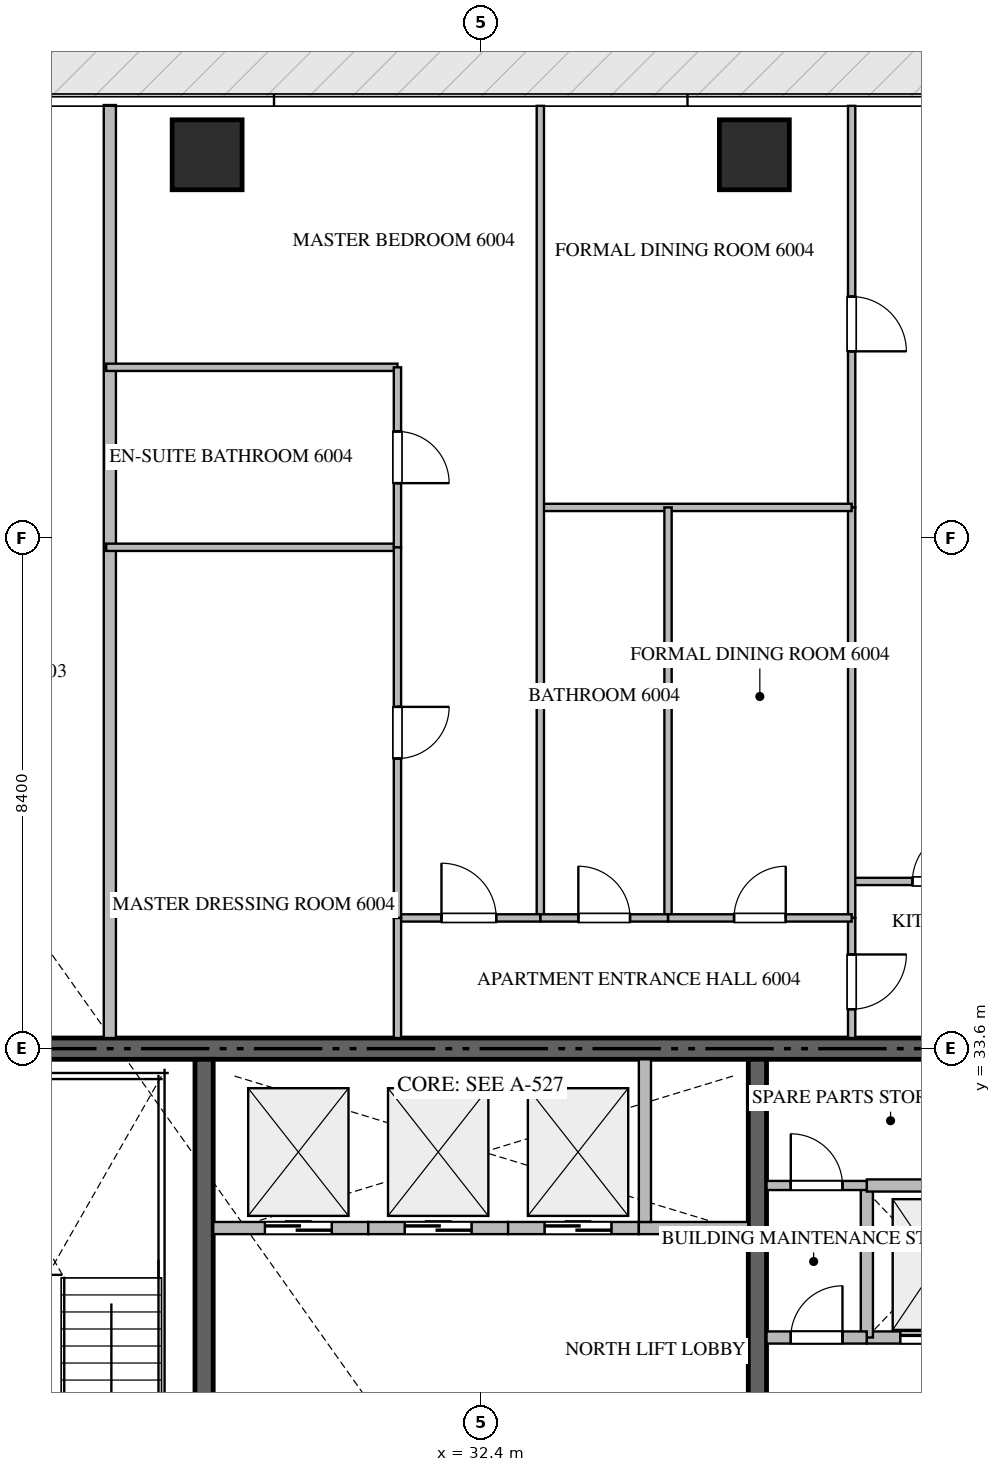
"""IFC4 building model, lengths in metres.
Left out: names, types, materials, properties, quantities, classifications, styles, units other than length and angle.
Written with IfcOpenShell. Run it as: python <this file> out.ifc"""

import sys

from ifc_helpers import new_model, si_unit, direction, frame, frame_2d, origin, origin_2d, place, context, subcontext, project, spatial, rectangle, extrude, source, transform, mapped, element, fill, save


model = new_model("IFC4")
c1 = context("Model", 3, precision=1e-05, world=origin(), true_north=direction((0.0, 1.0)))
c2 = subcontext(c1, "Body", "Model", "MODEL_VIEW")
j1 = project(units=[si_unit("LENGTHUNIT", "METRE"), si_unit("PLANEANGLEUNIT", "RADIAN")], contexts=[c1])
p1 = place(None, origin())
s1 = spatial("IfcSite", under=j1, at=p1, CompositionType="ELEMENT")
p2 = place(p1, origin())
s2 = spatial("IfcBuilding", under=s1, at=p2, CompositionType="ELEMENT")
p3 = place(p2, frame((0.0, 0.0, 241.25)))
s3 = spatial("IfcBuildingStorey", under=s2, at=p3, CompositionType="ELEMENT", Elevation=241.25)
p4 = place(p3, frame((41.4, 33.6, -0.26), z_axis=(0.0, 0.0, 1.0), x_axis=(-1.0, 0.0, 0.0)))
e1 = element("IfcWall", 1, at=p4, inside=s3, PredefinedType="SHEAR", context=c2, shape_type="SweptSolid", body=[
    extrude(rectangle(XDim=18.0, YDim=0.35, at=frame_2d((9.0, 0.0))), origin(), (0.0, 0.0, 1.0), 3.848),
])
p5 = place(p3, frame((27.85, 23.55, -0.26), z_axis=(0.0, 0.0, 1.0), x_axis=(0.0, 1.0, 0.0)))
e2 = element("IfcWall", 2, at=p5, inside=s3, PredefinedType="SHEAR", context=c2, shape_type="SweptSolid", body=[
    extrude(rectangle(XDim=9.875, YDim=0.3, at=frame_2d((4.938, 0.0))), origin(), (0.0, 0.0, 1.0), 3.848),
])
p6 = place(p3, frame((36.95, 27.05, -0.26), z_axis=(0.0, 0.0, 1.0), x_axis=(0.0, 1.0, 0.0)))
e3 = element("IfcWall", 3, at=p6, inside=s3, PredefinedType="SHEAR", context=c2, shape_type="SweptSolid", body=[
    extrude(rectangle(XDim=6.375, YDim=0.3, at=frame_2d((3.188, 0.0))), origin(), (0.0, 0.0, 1.0), 3.848),
])
m1 = source(origin(), c2, "Body", "SweptSolid", [
    extrude(rectangle(XDim=1.15, YDim=1.15, at=origin_2d()), origin(), (0.0, 0.0, 1.0), 3.85),
])
for number, where, z_axis, x_axis in (
    (4, (27.9, 48.3, -0.26), (0.0, 0.0, 1.0), (1.0, 0.0, 0.0)),
    (5, (36.9, 48.3, -0.26), (0.0, 0.0, 1.0), (1.0, 0.0, 0.0)),
):
    element("IfcColumn", number, at=place(p3, frame(where, z_axis=z_axis, x_axis=x_axis)), inside=s3, PredefinedType="COLUMN", context=c2, shape_type="MappedRepresentation", body=[
        mapped(m1, transform((0.0, 0.0, 0.0), scale=1.0)),
    ])
p7 = place(p3, frame((38.75, 28.85, 0.0), z_axis=(0.0, 0.0, 1.0), x_axis=(1.0, 0.0, 0.0)))
e6 = element("IfcWall", 6, at=p7, inside=s3, PredefinedType="STANDARD", context=c2, shape_type="SweptSolid", body=[
    extrude(rectangle(XDim=2.475, YDim=0.2, at=frame_2d((1.238, 0.0))), origin(), (0.0, 0.0, 1.0), 3.59),
])
p8 = place(p7, frame((0.55, 0.0, 0.0)))
e7 = element("IfcOpeningElement", 7, at=p8, cuts=e6, PredefinedType="OPENING", context=c2, shape_type="SweptSolid", body=[
    extrude(rectangle(XDim=1.2, YDim=2.2, at=frame_2d((0.6, 1.1))), frame((0.0, 0.11, 0.0), z_axis=(0.0, -1.0, 0.0), x_axis=(1.0, 0.0, 0.0)), (0.0, 0.0, 1.0), 0.22),
])
p9 = place(p3, frame((28.0, 30.65, 0.0), z_axis=(0.0, 0.0, 1.0), x_axis=(1.0, 0.0, 0.0)))
e8 = element("IfcWall", 8, at=p9, inside=s3, PredefinedType="STANDARD", context=c2, shape_type="SweptSolid", body=[
    extrude(rectangle(XDim=2.55, YDim=0.2, at=frame_2d((1.275, 0.0))), origin(), (0.0, 0.0, 1.0), 3.59),
])
p10 = place(p9, frame((0.85, 0.0, 0.0)))
e9 = element("IfcOpeningElement", 9, at=p10, cuts=e8, PredefinedType="OPENING", context=c2, shape_type="SweptSolid", body=[
    extrude(rectangle(XDim=1.1, YDim=2.2, at=frame_2d((0.55, 1.1))), frame((0.0, 0.11, 0.0), z_axis=(0.0, -1.0, 0.0), x_axis=(1.0, 0.0, 0.0)), (0.0, 0.0, 1.0), 0.22),
])
p11 = place(p3, frame((30.55, 30.65, 0.0), z_axis=(0.0, 0.0, 1.0), x_axis=(1.0, 0.0, 0.0)))
e10 = element("IfcWall", 10, at=p11, inside=s3, PredefinedType="STANDARD", context=c2, shape_type="SweptSolid", body=[
    extrude(rectangle(XDim=2.3, YDim=0.2, at=frame_2d((1.15, 0.0))), origin(), (0.0, 0.0, 1.0), 3.59),
])
p12 = place(p11, frame((0.6, 0.0, 0.0)))
e11 = element("IfcOpeningElement", 11, at=p12, cuts=e10, PredefinedType="OPENING", context=c2, shape_type="SweptSolid", body=[
    extrude(rectangle(XDim=1.1, YDim=2.2, at=frame_2d((0.55, 1.1))), frame((0.0, 0.11, 0.0), z_axis=(0.0, -1.0, 0.0), x_axis=(1.0, 0.0, 0.0)), (0.0, 0.0, 1.0), 0.22),
])
p13 = place(p3, frame((32.85, 30.65, 0.0), z_axis=(0.0, 0.0, 1.0), x_axis=(1.0, 0.0, 0.0)))
e12 = element("IfcWall", 12, at=p13, inside=s3, PredefinedType="STANDARD", context=c2, shape_type="SweptSolid", body=[
    extrude(rectangle(XDim=2.15, YDim=0.2, at=frame_2d((1.075, 0.0))), origin(), (0.0, 0.0, 1.0), 3.59),
])
p14 = place(p13, frame((0.6, 0.0, 0.0)))
e13 = element("IfcOpeningElement", 13, at=p14, cuts=e12, PredefinedType="OPENING", context=c2, shape_type="SweptSolid", body=[
    extrude(rectangle(XDim=1.1, YDim=2.2, at=frame_2d((0.55, 1.1))), frame((0.0, 0.11, 0.0), z_axis=(0.0, -1.0, 0.0), x_axis=(1.0, 0.0, 0.0)), (0.0, 0.0, 1.0), 0.22),
])
p15 = place(p3, frame((35.0, 30.65, 0.0), z_axis=(0.0, 0.0, 1.0), x_axis=(1.0, 0.0, 0.0)))
e14 = element("IfcWall", 14, at=p15, inside=s3, PredefinedType="STANDARD", context=c2, shape_type="SweptSolid", body=[
    extrude(rectangle(XDim=1.8, YDim=0.2, at=frame_2d((0.9, 0.0))), origin(), (0.0, 0.0, 1.0), 3.59),
])
p16 = place(p3, frame((35.1, 30.75, 0.0), z_axis=(0.0, 0.0, 1.0), x_axis=(0.0, 1.0, 0.0)))
e15 = element("IfcWall", 15, at=p16, inside=s3, PredefinedType="STANDARD", context=c2, shape_type="SweptSolid", body=[
    extrude(rectangle(XDim=2.675, YDim=0.2, at=frame_2d((1.337, 0.0))), origin(), (0.0, 0.0, 1.0), 3.59),
])
p17 = place(p3, frame((38.75, 28.85, 0.0), z_axis=(0.0, 0.0, 1.0), x_axis=(0.0, 1.0, 0.0)))
e16 = element("IfcWall", 16, at=p17, inside=s3, PredefinedType="STANDARD", context=c2, shape_type="SweptSolid", body=[
    extrude(rectangle(XDim=2.5, YDim=0.2, at=frame_2d((1.25, 0.0))), origin(), (0.0, 0.0, 1.0), 3.59),
])
p18 = place(p3, frame((38.75, 31.35, 0.0), z_axis=(0.0, 0.0, 1.0), x_axis=(1.0, 0.0, 0.0)))
e17 = element("IfcWall", 17, at=p18, inside=s3, PredefinedType="STANDARD", context=c2, shape_type="SweptSolid", body=[
    extrude(rectangle(XDim=2.475, YDim=0.2, at=frame_2d((1.238, 0.0))), origin(), (0.0, 0.0, 1.0), 3.59),
])
p19 = place(p3, frame((37.1, 28.85, 0.0), z_axis=(0.0, 0.0, 1.0), x_axis=(1.0, 0.0, 0.0)))
e18 = element("IfcWall", 18, at=p19, inside=s3, PredefinedType="STANDARD", context=c2, shape_type="SweptSolid", body=[
    extrude(rectangle(XDim=1.648, YDim=0.2, at=frame_2d((0.824, 0.0))), origin(), (0.0, 0.0, 1.0), 3.59),
])
p20 = place(p19, frame((0.399, 0.0, 0.0)))
e19 = element("IfcOpeningElement", 19, at=p20, cuts=e18, PredefinedType="OPENING", context=c2, shape_type="SweptSolid", body=[
    extrude(rectangle(XDim=0.85, YDim=2.1, at=frame_2d((0.425, 1.05))), frame((0.0, 0.11, 0.0), z_axis=(0.0, -1.0, 0.0), x_axis=(1.0, 0.0, 0.0)), (0.0, 0.0, 1.0), 0.22),
])
p21 = place(p3, frame((37.1, 31.35, 0.0), z_axis=(0.0, 0.0, 1.0), x_axis=(1.0, 0.0, 0.0)))
e20 = element("IfcWall", 20, at=p21, inside=s3, PredefinedType="PARTITIONING", context=c2, shape_type="SweptSolid", body=[
    extrude(rectangle(XDim=1.648, YDim=0.15, at=frame_2d((0.824, 0.0))), origin(), (0.0, 0.0, 1.0), 3.59),
])
p22 = place(p21, frame((0.399, 0.0, 0.0)))
e21 = element("IfcOpeningElement", 21, at=p22, cuts=e20, PredefinedType="OPENING", context=c2, shape_type="SweptSolid", body=[
    extrude(rectangle(XDim=0.85, YDim=2.1, at=frame_2d((0.425, 1.05))), frame((0.0, 0.085, 0.0), z_axis=(0.0, -1.0, 0.0), x_axis=(1.0, 0.0, 0.0)), (0.0, 0.0, 1.0), 0.17),
])
p23 = place(p3, frame((26.3, 33.775, 0.0), z_axis=(0.0, 0.0, 1.0), x_axis=(0.0, 1.0, 0.0)))
e22 = element("IfcWall", 22, at=p23, inside=s3, PredefinedType="PARTITIONING", context=c2, shape_type="SweptSolid", body=[
    extrude(rectangle(XDim=15.343, YDim=0.2, at=frame_2d((7.671, 0.0))), origin(), (0.0, 0.0, 1.0), 3.59),
])
p24 = place(p3, frame((38.5, 36.35, 0.0), z_axis=(0.0, 0.0, 1.0), x_axis=(1.0, 0.0, 0.0)))
e23 = element("IfcWall", 23, at=p24, inside=s3, PredefinedType="PARTITIONING", context=c2, shape_type="SweptSolid", body=[
    extrude(rectangle(XDim=2.85, YDim=0.12, at=frame_2d((1.425, 0.0))), origin(), (0.0, 0.0, 1.0), 3.59),
])
p25 = place(p24, frame((1.0, 0.0, 0.0)))
e24 = element("IfcOpeningElement", 24, at=p25, cuts=e23, PredefinedType="OPENING", context=c2, shape_type="SweptSolid", body=[
    extrude(rectangle(XDim=0.85, YDim=2.1, at=frame_2d((0.425, 1.05))), frame((0.0, 0.07, 0.0), z_axis=(0.0, -1.0, 0.0), x_axis=(1.0, 0.0, 0.0)), (0.0, 0.0, 1.0), 0.14),
])
p26 = place(p3, frame((38.5, 35.75, 0.0), z_axis=(0.0, 0.0, 1.0), x_axis=(0.0, -1.0, 0.0)))
e25 = element("IfcWall", 25, at=p26, inside=s3, PredefinedType="PARTITIONING", context=c2, shape_type="SweptSolid", body=[
    extrude(rectangle(XDim=1.975, YDim=0.12, at=frame_2d((0.988, 0.0))), origin(), (0.0, 0.0, 1.0), 3.59),
])
p27 = place(p26, frame((0.601, 0.0, 0.0)))
e26 = element("IfcOpeningElement", 26, at=p27, cuts=e25, PredefinedType="OPENING", context=c2, shape_type="SweptSolid", body=[
    extrude(rectangle(XDim=0.9, YDim=2.1, at=frame_2d((0.45, 1.05))), frame((0.0, 0.07, 0.0), z_axis=(0.0, -1.0, 0.0), x_axis=(1.0, 0.0, 0.0)), (0.0, 0.0, 1.0), 0.14),
])
p28 = place(p3, frame((38.5, 49.105, 0.0), z_axis=(0.0, 0.0, 1.0), x_axis=(0.0, -1.0, 0.0)))
e27 = element("IfcWall", 27, at=p28, inside=s3, PredefinedType="PARTITIONING", context=c2, shape_type="SweptSolid", body=[
    extrude(rectangle(XDim=6.604, YDim=0.12, at=frame_2d((3.302, 0.0))), origin(), (0.0, 0.0, 1.0), 3.59),
])
p29 = place(p28, frame((3.137, 0.0, 0.0)))
e28 = element("IfcOpeningElement", 28, at=p29, cuts=e27, PredefinedType="OPENING", context=c2, shape_type="SweptSolid", body=[
    extrude(rectangle(XDim=0.9, YDim=2.1, at=frame_2d((0.45, 1.05))), frame((0.0, 0.07, 0.0), z_axis=(0.0, -1.0, 0.0), x_axis=(1.0, 0.0, 0.0)), (0.0, 0.0, 1.0), 0.14),
])
p30 = place(p3, frame((38.5, 42.499, 0.0), z_axis=(0.0, 0.0, 1.0), x_axis=(0.0, -1.0, 0.0)))
e29 = element("IfcWall", 29, at=p30, inside=s3, PredefinedType="PARTITIONING", context=c2, shape_type="SweptSolid", body=[
    extrude(rectangle(XDim=6.747, YDim=0.12, at=frame_2d((3.374, 0.0))), origin(), (0.0, 0.0, 1.0), 3.59),
])
p31 = place(p3, frame((33.38, 42.501, 0.0), z_axis=(0.0, 0.0, 1.0), x_axis=(1.0, 0.0, 0.0)))
e30 = element("IfcWall", 30, at=p31, inside=s3, PredefinedType="PARTITIONING", context=c2, shape_type="SweptSolid", body=[
    extrude(rectangle(XDim=5.12, YDim=0.12, at=frame_2d((2.56, 0.0))), origin(), (0.0, 0.0, 1.0), 3.59),
])
p32 = place(p3, frame((33.38, 49.105, 0.0), z_axis=(0.0, 0.0, 1.0), x_axis=(0.0, -1.0, 0.0)))
e31 = element("IfcWall", 31, at=p32, inside=s3, PredefinedType="PARTITIONING", context=c2, shape_type="SweptSolid", body=[
    extrude(rectangle(XDim=13.355, YDim=0.12, at=frame_2d((6.677, 0.0))), origin(), (0.0, 0.0, 1.0), 3.59),
])
p33 = place(p3, frame((35.48, 42.501, 0.0), z_axis=(0.0, 0.0, 1.0), x_axis=(0.0, -1.0, 0.0)))
e32 = element("IfcWall", 32, at=p33, inside=s3, PredefinedType="PARTITIONING", context=c2, shape_type="SweptSolid", body=[
    extrude(rectangle(XDim=6.751, YDim=0.12, at=frame_2d((3.375, 0.0))), origin(), (0.0, 0.0, 1.0), 3.59),
])
p34 = place(p3, frame((33.38, 35.75, 0.0), z_axis=(0.0, 0.0, 1.0), x_axis=(1.0, 0.0, 0.0)))
e33 = element("IfcWall", 33, at=p34, inside=s3, PredefinedType="PARTITIONING", context=c2, shape_type="SweptSolid", body=[
    extrude(rectangle(XDim=2.1, YDim=0.12, at=frame_2d((1.05, 0.0))), origin(), (0.0, 0.0, 1.0), 3.59),
])
p35 = place(p34, frame((0.625, 0.0, 0.0)))
e34 = element("IfcOpeningElement", 34, at=p35, cuts=e33, PredefinedType="OPENING", context=c2, shape_type="SweptSolid", body=[
    extrude(rectangle(XDim=0.85, YDim=2.1, at=frame_2d((0.425, 1.05))), frame((0.0, 0.07, 0.0), z_axis=(0.0, -1.0, 0.0), x_axis=(1.0, 0.0, 0.0)), (0.0, 0.0, 1.0), 0.14),
])
p36 = place(p3, frame((35.482, 35.75, 0.0), z_axis=(0.0, 0.0, 1.0), x_axis=(1.0, 0.0, 0.0)))
e35 = element("IfcWall", 35, at=p36, inside=s3, PredefinedType="PARTITIONING", context=c2, shape_type="SweptSolid", body=[
    extrude(rectangle(XDim=3.018, YDim=0.12, at=frame_2d((1.509, 0.0))), origin(), (0.0, 0.0, 1.0), 3.59),
])
p37 = place(p36, frame((1.084, 0.0, 0.0)))
e36 = element("IfcOpeningElement", 36, at=p37, cuts=e35, PredefinedType="OPENING", context=c2, shape_type="SweptSolid", body=[
    extrude(rectangle(XDim=0.85, YDim=2.1, at=frame_2d((0.425, 1.05))), frame((0.0, 0.07, 0.0), z_axis=(0.0, -1.0, 0.0), x_axis=(1.0, 0.0, 0.0)), (0.0, 0.0, 1.0), 0.14),
])
p38 = place(p3, frame((31.03, 35.75, 0.0), z_axis=(0.0, 0.0, 1.0), x_axis=(1.0, 0.0, 0.0)))
e37 = element("IfcWall", 37, at=p38, inside=s3, PredefinedType="PARTITIONING", context=c2, shape_type="SweptSolid", body=[
    extrude(rectangle(XDim=2.348, YDim=0.12, at=frame_2d((1.174, 0.0))), origin(), (0.0, 0.0, 1.0), 3.59),
])
p39 = place(p38, frame((0.724, 0.0, 0.0)))
e38 = element("IfcOpeningElement", 38, at=p39, cuts=e37, PredefinedType="OPENING", context=c2, shape_type="SweptSolid", body=[
    extrude(rectangle(XDim=0.9, YDim=2.1, at=frame_2d((0.45, 1.05))), frame((0.0, 0.07, 0.0), z_axis=(0.0, -1.0, 0.0), x_axis=(1.0, 0.0, 0.0)), (0.0, 0.0, 1.0), 0.14),
])
for number, where, z_axis, x_axis in (
    (39, (26.24, 44.805, 0.0), (0.0, 0.0, 1.0), (1.0, 0.0, 0.0)),
    (40, (26.24, 41.845, 0.0), (0.0, 0.0, 1.0), (1.0, 0.0, 0.0)),
):
    element("IfcWall", number, at=place(p3, frame(where, z_axis=z_axis, x_axis=x_axis)), inside=s3, PredefinedType="PARTITIONING", context=c2, shape_type="SweptSolid", body=[
        extrude(rectangle(XDim=4.79, YDim=0.12, at=frame_2d((2.395, 0.0))), origin(), (0.0, 0.0, 1.0), 3.59),
    ])
p40 = place(p3, frame((31.03, 44.805, 0.0), z_axis=(0.0, 0.0, 1.0), x_axis=(0.0, -1.0, 0.0)))
e41 = element("IfcWall", 41, at=p40, inside=s3, PredefinedType="PARTITIONING", context=c2, shape_type="SweptSolid", body=[
    extrude(rectangle(XDim=2.96, YDim=0.12, at=frame_2d((1.48, 0.0))), origin(), (0.0, 0.0, 1.0), 3.59),
])
p41 = place(p40, frame((1.055, 0.0, 0.0)))
e42 = element("IfcOpeningElement", 42, at=p41, cuts=e41, PredefinedType="OPENING", context=c2, shape_type="SweptSolid", body=[
    extrude(rectangle(XDim=0.85, YDim=2.1, at=frame_2d((0.425, 1.05))), frame((0.0, 0.07, 0.0), z_axis=(0.0, -1.0, 0.0), x_axis=(1.0, 0.0, 0.0)), (0.0, 0.0, 1.0), 0.14),
])
p42 = place(p3, frame((31.03, 41.843, 0.0), z_axis=(0.0, 0.0, 1.0), x_axis=(0.0, -1.0, 0.0)))
e43 = element("IfcWall", 43, at=p42, inside=s3, PredefinedType="PARTITIONING", context=c2, shape_type="SweptSolid", body=[
    extrude(rectangle(XDim=6.093, YDim=0.12, at=frame_2d((3.046, 0.0))), origin(), (0.0, 0.0, 1.0), 3.59),
])
p43 = place(p42, frame((2.622, 0.0, 0.0)))
e44 = element("IfcOpeningElement", 44, at=p43, cuts=e43, PredefinedType="OPENING", context=c2, shape_type="SweptSolid", body=[
    extrude(rectangle(XDim=0.85, YDim=2.1, at=frame_2d((0.425, 1.05))), frame((0.0, 0.07, 0.0), z_axis=(0.0, -1.0, 0.0), x_axis=(1.0, 0.0, 0.0)), (0.0, 0.0, 1.0), 0.14),
])
p44 = place(p3, frame((31.03, 35.748, 0.0), z_axis=(0.0, 0.0, 1.0), x_axis=(0.0, -1.0, 0.0)))
e45 = element("IfcWall", 45, at=p44, inside=s3, PredefinedType="PARTITIONING", context=c2, shape_type="SweptSolid", body=[
    extrude(rectangle(XDim=1.973, YDim=0.12, at=frame_2d((0.987, 0.0))), origin(), (0.0, 0.0, 1.0), 3.59),
])
m2 = source(origin(), c2, "Body", "SweptSolid", [
    extrude(rectangle(XDim=1.2, YDim=2.2, at=frame_2d((0.6, 1.1))), frame((0.0, 0.025, 0.0), z_axis=(0.0, -1.0, 0.0), x_axis=(1.0, 0.0, 0.0)), (0.0, 0.0, 1.0), 0.05),
])
p45 = place(p8, origin())
e46 = element("IfcDoor", 46, at=p45, inside=s3, OperationType="DOUBLE_DOOR_SLIDING", PredefinedType="DOOR", context=c2, shape_type="MappedRepresentation", body=[
    mapped(m2, transform((0.0, 0.0, 0.0), scale=1.0)),
])
fill(e7, e46)
m3 = source(origin(), c2, "Body", "SweptSolid", [
    extrude(rectangle(XDim=1.1, YDim=2.2, at=frame_2d((0.55, 1.1))), frame((0.0, 0.025, 0.0), z_axis=(0.0, -1.0, 0.0), x_axis=(1.0, 0.0, 0.0)), (0.0, 0.0, 1.0), 0.05),
])
p46 = place(p10, origin())
e47 = element("IfcDoor", 47, at=p46, inside=s3, OperationType="DOUBLE_DOOR_SLIDING", PredefinedType="DOOR", context=c2, shape_type="MappedRepresentation", body=[
    mapped(m3, transform((0.0, 0.0, 0.0), scale=1.0)),
])
fill(e9, e47)
p47 = place(p12, origin())
e48 = element("IfcDoor", 48, at=p47, inside=s3, OperationType="DOUBLE_DOOR_SLIDING", PredefinedType="DOOR", context=c2, shape_type="MappedRepresentation", body=[
    mapped(m3, transform((0.0, 0.0, 0.0), scale=1.0)),
])
fill(e11, e48)
p48 = place(p14, origin())
e49 = element("IfcDoor", 49, at=p48, inside=s3, OperationType="DOUBLE_DOOR_SLIDING", PredefinedType="DOOR", context=c2, shape_type="MappedRepresentation", body=[
    mapped(m3, transform((0.0, 0.0, 0.0), scale=1.0)),
])
fill(e13, e49)
m4 = source(origin(), c2, "Body", "SweptSolid", [
    extrude(rectangle(XDim=0.85, YDim=2.1, at=frame_2d((0.425, 1.05))), frame((0.0, 0.025, 0.0), z_axis=(0.0, -1.0, 0.0), x_axis=(1.0, 0.0, 0.0)), (0.0, 0.0, 1.0), 0.05),
])
p49 = place(p20, origin())
e50 = element("IfcDoor", 50, at=p49, inside=s3, OperationType="SINGLE_SWING_RIGHT", PredefinedType="DOOR", context=c2, shape_type="MappedRepresentation", body=[
    mapped(m4, transform((0.0, 0.0, 0.0), scale=1.0)),
])
fill(e19, e50)
p50 = place(p22, origin())
e51 = element("IfcDoor", 51, at=p50, inside=s3, OperationType="SINGLE_SWING_LEFT", PredefinedType="DOOR", context=c2, shape_type="MappedRepresentation", body=[
    mapped(m4, transform((0.0, 0.0, 0.0), scale=1.0)),
])
fill(e21, e51)
p51 = place(p25, origin())
e52 = element("IfcDoor", 52, at=p51, inside=s3, OperationType="SINGLE_SWING_RIGHT", PredefinedType="DOOR", context=c2, shape_type="MappedRepresentation", body=[
    mapped(m4, transform((0.0, 0.0, 0.0), scale=1.0)),
])
fill(e24, e52)
m5 = source(origin(), c2, "Body", "SweptSolid", [
    extrude(rectangle(XDim=0.9, YDim=2.1, at=frame_2d((0.45, 1.05))), frame((0.0, 0.025, 0.0), z_axis=(0.0, -1.0, 0.0), x_axis=(1.0, 0.0, 0.0)), (0.0, 0.0, 1.0), 0.05),
])
p52 = place(p27, origin())
e53 = element("IfcDoor", 53, at=p52, inside=s3, OperationType="SINGLE_SWING_LEFT", PredefinedType="DOOR", context=c2, shape_type="MappedRepresentation", body=[
    mapped(m5, transform((0.0, 0.0, 0.0), scale=1.0)),
])
fill(e26, e53)
p53 = place(p29, origin())
e54 = element("IfcDoor", 54, at=p53, inside=s3, OperationType="SINGLE_SWING_RIGHT", PredefinedType="DOOR", context=c2, shape_type="MappedRepresentation", body=[
    mapped(m5, transform((0.0, 0.0, 0.0), scale=1.0)),
])
fill(e28, e54)
p54 = place(p35, origin())
e55 = element("IfcDoor", 55, at=p54, inside=s3, OperationType="SINGLE_SWING_LEFT", PredefinedType="DOOR", context=c2, shape_type="MappedRepresentation", body=[
    mapped(m4, transform((0.0, 0.0, 0.0), scale=1.0)),
])
fill(e34, e55)
p55 = place(p37, origin())
e56 = element("IfcDoor", 56, at=p55, inside=s3, OperationType="SINGLE_SWING_RIGHT", PredefinedType="DOOR", context=c2, shape_type="MappedRepresentation", body=[
    mapped(m4, transform((0.0, 0.0, 0.0), scale=1.0)),
])
fill(e36, e56)
p56 = place(p39, origin())
e57 = element("IfcDoor", 57, at=p56, inside=s3, OperationType="SINGLE_SWING_LEFT", PredefinedType="DOOR", context=c2, shape_type="MappedRepresentation", body=[
    mapped(m5, transform((0.0, 0.0, 0.0), scale=1.0)),
])
fill(e38, e57)
p57 = place(p41, origin())
e58 = element("IfcDoor", 58, at=p57, inside=s3, OperationType="SINGLE_SWING_RIGHT", PredefinedType="DOOR", context=c2, shape_type="MappedRepresentation", body=[
    mapped(m4, transform((0.0, 0.0, 0.0), scale=1.0)),
])
fill(e42, e58)
p58 = place(p43, origin())
e59 = element("IfcDoor", 59, at=p58, inside=s3, OperationType="SINGLE_SWING_LEFT", PredefinedType="DOOR", context=c2, shape_type="MappedRepresentation", body=[
    mapped(m4, transform((0.0, 0.0, 0.0), scale=1.0)),
])
fill(e44, e59)
save(model, sys.argv[1])
